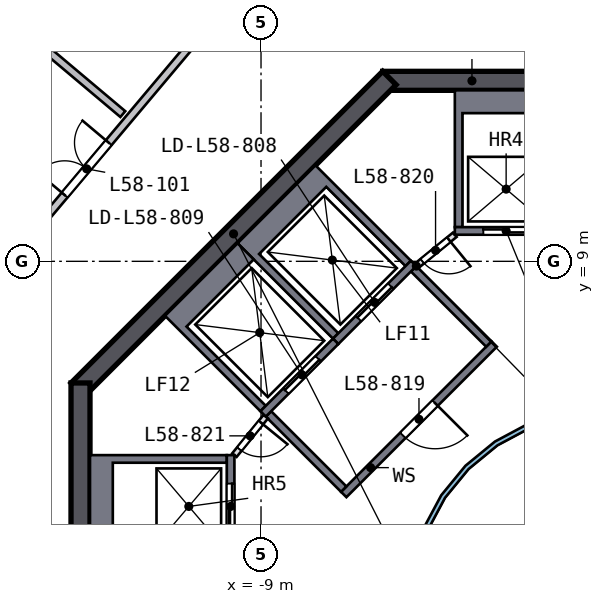
"""IFC4 building model, lengths in metres.
Left out: names, types, materials, properties, quantities, classifications, styles, units other than length and angle.
Written with IfcOpenShell. Run it as: python <this file> out.ifc"""

import sys

from ifc_helpers import new_model, si_unit, direction, frame, frame_2d, origin, place, context, subcontext, project, spatial, polyline, rectangle, outline, extrude, element, fill, save


model = new_model("IFC4")
c1 = context("Model", 3, precision=1e-05, world=origin(), true_north=direction((0.0, 1.0)))
c2 = subcontext(c1, "Body", "Model", "MODEL_VIEW")
j1 = project(units=[si_unit("LENGTHUNIT", "METRE"), si_unit("PLANEANGLEUNIT", "RADIAN")], contexts=[c1])
p1 = place(None, origin())
s1 = spatial("IfcSite", under=j1, at=p1, CompositionType="ELEMENT")
p2 = place(p1, origin())
s2 = spatial("IfcBuilding", under=s1, at=p2, CompositionType="ELEMENT")
p3 = place(p2, frame((0.0, 0.0, 237.5)))
s3 = spatial("IfcBuildingStorey", under=s2, at=p3, CompositionType="ELEMENT", Elevation=237.5)
p4 = place(p3, frame((5.799, 13.75, 0.0), z_axis=(0.0, 0.0, 1.0), x_axis=(-1.0, 0.0, 0.0)))
e1 = element("IfcWall", 1, at=p4, inside=s3, PredefinedType="SHEAR", context=c2, shape_type="SweptSolid", body=[
    extrude(rectangle(XDim=11.598, YDim=0.5, at=frame_2d((5.799, 0.0))), origin(), (0.0, 0.0, 1.0), 3.5),
])
p5 = place(p4, frame((4.899, 0.0, 0.0)))
e2 = element("IfcOpeningElement", 2, at=p5, cuts=e1, PredefinedType="OPENING", context=c2, shape_type="SweptSolid", body=[
    extrude(rectangle(XDim=1.8, YDim=2.1, at=frame_2d((0.9, 1.05))), frame((0.0, 0.26, 0.0), z_axis=(0.0, -1.0, 0.0), x_axis=(1.0, 0.0, 0.0)), (0.0, 0.0, 1.0), 0.52),
])
p6 = place(p3, frame((-5.622, 13.823, 0.0), z_axis=(0.0, 0.0, 1.0), x_axis=(-0.707106781, -0.707106781, 0.0)))
e3 = element("IfcWall", 3, at=p6, inside=s3, PredefinedType="SHEAR", context=c2, shape_type="SweptSolid", body=[
    extrude(rectangle(XDim=11.598, YDim=0.5, at=frame_2d((5.799, 0.0))), origin(), (0.0, 0.0, 1.0), 3.5),
])
p7 = place(p3, frame((-13.75, 5.799, 0.0), z_axis=(0.0, 0.0, 1.0), x_axis=(0.0, -1.0, 0.0)))
e4 = element("IfcWall", 4, at=p7, inside=s3, PredefinedType="SHEAR", context=c2, shape_type="SweptSolid", body=[
    extrude(rectangle(XDim=11.598, YDim=0.5, at=frame_2d((5.799, 0.0))), origin(), (0.0, 0.0, 1.0), 3.5),
])
p8 = place(p7, frame((4.899, 0.0, 0.0)))
e5 = element("IfcOpeningElement", 5, at=p8, cuts=e4, PredefinedType="OPENING", context=c2, shape_type="SweptSolid", body=[
    extrude(rectangle(XDim=1.8, YDim=2.1, at=frame_2d((0.9, 1.05))), frame((0.0, 0.26, 0.0), z_axis=(0.0, -1.0, 0.0), x_axis=(1.0, 0.0, 0.0)), (0.0, 0.0, 1.0), 0.52),
])
p9 = place(p3, origin())
e6 = element("IfcWall", 6, at=p9, inside=s3, PredefinedType="SOLIDWALL", context=c2, shape_type="SweptSolid", body=[
    extrude(outline(polyline([(-3.9, 13.5), (-1.2, 13.5), (-1.2, 9.9), (-1.4, 9.9), (-1.4, 12.9), (-3.7, 12.9), (-3.7, 9.9), (-3.9, 9.9), (-3.9, 13.5)])), origin(), (0.0, 0.0, 1.0), 3.19),
])
p10 = place(p3, frame((-1.2, 9.8, 0.0), z_axis=(0.0, 0.0, 1.0), x_axis=(-1.0, 0.0, 0.0)))
e7 = element("IfcWall", 7, at=p10, inside=s3, PredefinedType="SOLIDWALL", context=c2, shape_type="SweptSolid", body=[
    extrude(rectangle(XDim=2.7, YDim=0.2, at=frame_2d((1.35, 0.0))), origin(), (0.0, 0.0, 1.0), 3.19),
])
p11 = place(p10, frame((0.75, 0.0, 0.0)))
e8 = element("IfcOpeningElement", 8, at=p11, cuts=e7, PredefinedType="OPENING", context=c2, shape_type="SweptSolid", body=[
    extrude(rectangle(XDim=1.2, YDim=2.1, at=frame_2d((0.6, 1.05))), frame((0.0, 0.11, 0.0), z_axis=(0.0, -1.0, 0.0), x_axis=(1.0, 0.0, 0.0)), (0.0, 0.0, 1.0), 0.22),
])
p12 = place(p3, origin())
e9 = element("IfcWall", 9, at=p12, inside=s3, PredefinedType="SOLIDWALL", context=c2, shape_type="SweptSolid", body=[
    extrude(outline(polyline([(-13.5, 3.9), (-9.9, 3.9), (-9.9, 3.7), (-12.9, 3.7), (-12.9, 1.4), (-9.9, 1.4), (-9.9, 1.2), (-13.5, 1.2), (-13.5, 3.9)])), origin(), (0.0, 0.0, 1.0), 3.19),
])
p13 = place(p3, frame((-9.8, 1.2, 0.0), z_axis=(0.0, 0.0, 1.0), x_axis=(0.0, 1.0, 0.0)))
e10 = element("IfcWall", 10, at=p13, inside=s3, PredefinedType="SOLIDWALL", context=c2, shape_type="SweptSolid", body=[
    extrude(rectangle(XDim=2.7, YDim=0.2, at=frame_2d((1.35, 0.0))), origin(), (0.0, 0.0, 1.0), 3.19),
])
p14 = place(p13, frame((0.75, 0.0, 0.0)))
e11 = element("IfcOpeningElement", 11, at=p14, cuts=e10, PredefinedType="OPENING", context=c2, shape_type="SweptSolid", body=[
    extrude(rectangle(XDim=1.2, YDim=2.1, at=frame_2d((0.6, 1.05))), frame((0.0, 0.11, 0.0), z_axis=(0.0, -1.0, 0.0), x_axis=(1.0, 0.0, 0.0)), (0.0, 0.0, 1.0), 0.22),
])
p15 = place(p3, origin())
e12 = element("IfcWall", 12, at=p15, inside=s3, PredefinedType="SOLIDWALL", context=c2, shape_type="SweptSolid", body=[
    extrude(outline(polyline([(-9.617, 9.475), (-7.566, 11.526), (-5.056, 9.016), (-5.197, 8.874), (-7.283, 10.96), (-9.051, 9.192), (-6.965, 7.106), (-7.106, 6.965), (-9.617, 9.475)])), origin(), (0.0, 0.0, 1.0), 3.19),
])
p16 = place(p3, frame((-4.985, 8.945, 0.0), z_axis=(0.0, 0.0, 1.0), x_axis=(-0.707106781, -0.707106781, 0.0)))
e13 = element("IfcWall", 13, at=p16, inside=s3, PredefinedType="SOLIDWALL", context=c2, shape_type="SweptSolid", body=[
    extrude(rectangle(XDim=2.9, YDim=0.2, at=frame_2d((1.45, 0.0))), origin(), (0.0, 0.0, 1.0), 3.19),
])
p17 = place(p16, frame((0.85, 0.0, 0.0)))
e14 = element("IfcOpeningElement", 14, at=p17, cuts=e13, PredefinedType="OPENING", context=c2, shape_type="SweptSolid", body=[
    extrude(rectangle(XDim=1.2, YDim=2.1, at=frame_2d((0.6, 1.05))), frame((0.0, 0.11, 0.0), z_axis=(0.0, -1.0, 0.0), x_axis=(1.0, 0.0, 0.0)), (0.0, 0.0, 1.0), 0.22),
])
p18 = place(p3, origin())
e15 = element("IfcWall", 15, at=p18, inside=s3, PredefinedType="SOLIDWALL", context=c2, shape_type="SweptSolid", body=[
    extrude(outline(polyline([(-11.526, 7.566), (-9.617, 9.475), (-9.192, 9.051), (-10.96, 7.283), (-8.874, 5.197), (-9.016, 5.056), (-11.526, 7.566)])), origin(), (0.0, 0.0, 1.0), 3.19),
])
p19 = place(p3, frame((-7.036, 6.894, 0.0), z_axis=(0.0, 0.0, 1.0), x_axis=(-0.707106781, -0.707106781, 0.0)))
e16 = element("IfcWall", 16, at=p19, inside=s3, PredefinedType="SOLIDWALL", context=c2, shape_type="SweptSolid", body=[
    extrude(rectangle(XDim=2.7, YDim=0.2, at=frame_2d((1.35, 0.0))), origin(), (0.0, 0.0, 1.0), 3.19),
])
p20 = place(p19, frame((0.65, 0.0, 0.0)))
e17 = element("IfcOpeningElement", 17, at=p20, cuts=e16, PredefinedType="OPENING", context=c2, shape_type="SweptSolid", body=[
    extrude(rectangle(XDim=1.2, YDim=2.1, at=frame_2d((0.6, 1.05))), frame((0.0, 0.11, 0.0), z_axis=(0.0, -1.0, 0.0), x_axis=(1.0, 0.0, 0.0)), (0.0, 0.0, 1.0), 0.22),
])
p21 = place(p3, frame((-2.864, 6.823, 0.0), z_axis=(0.0, 0.0, 1.0), x_axis=(-0.707106781, -0.707106781, 0.0)))
e18 = element("IfcWall", 18, at=p21, inside=s3, PredefinedType="SOLIDWALL", context=c2, shape_type="SweptSolid", body=[
    extrude(rectangle(XDim=5.6, YDim=0.2, at=frame_2d((2.8, 0.0))), origin(), (0.0, 0.0, 1.0), 3.19),
])
p22 = place(p21, frame((2.2, 0.0, 0.0)))
e19 = element("IfcOpeningElement", 19, at=p22, cuts=e18, PredefinedType="OPENING", context=c2, shape_type="SweptSolid", body=[
    extrude(rectangle(XDim=1.2, YDim=2.1, at=frame_2d((0.6, 1.05))), frame((0.0, 0.11, 0.0), z_axis=(0.0, -1.0, 0.0), x_axis=(1.0, 0.0, 0.0)), (0.0, 0.0, 1.0), 0.22),
])
for number, where, z_axis, x_axis in (
    (20, (-3.005, 6.823, 0.0), (0.0, 0.0, 1.0), (-0.707, 0.707, 0.0)),
    (21, (-6.823, 3.005, 0.0), (0.0, 0.0, 1.0), (-0.707, 0.707, 0.0)),
):
    element("IfcWall", number, at=place(p3, frame(where, z_axis=z_axis, x_axis=x_axis)), inside=s3, PredefinedType="SOLIDWALL", context=c2, shape_type="SweptSolid", body=[
        extrude(rectangle(XDim=2.8, YDim=0.2, at=frame_2d((1.4, 0.0))), origin(), (0.0, 0.0, 1.0), 3.19),
    ])
p23 = place(p3, frame((-3.9, 9.7, 0.0), z_axis=(0.0, 0.0, 1.0), x_axis=(-0.775559878, -0.631274009, 0.0)))
e22 = element("IfcWall", 22, at=p23, inside=s3, PredefinedType="PARTITIONING", context=c2, shape_type="SweptSolid", body=[
    extrude(rectangle(XDim=1.308, YDim=0.15, at=frame_2d((0.654, 0.0))), origin(), (0.0, 0.0, 1.0), 3.19),
])
p24 = place(p23, frame((0.204, 0.0, 0.0)))
e23 = element("IfcOpeningElement", 23, at=p24, cuts=e22, PredefinedType="OPENING", context=c2, shape_type="SweptSolid", body=[
    extrude(rectangle(XDim=0.9, YDim=2.1, at=frame_2d((0.45, 1.05))), frame((0.0, 0.085, 0.0), z_axis=(0.0, -1.0, 0.0), x_axis=(1.0, 0.0, 0.0)), (0.0, 0.0, 1.0), 0.17),
])
p25 = place(p3, frame((-8.874, 4.914, 0.0), z_axis=(0.0, 0.0, 1.0), x_axis=(-0.631274009, -0.775559878, 0.0)))
e24 = element("IfcWall", 24, at=p25, inside=s3, PredefinedType="PARTITIONING", context=c2, shape_type="SweptSolid", body=[
    extrude(rectangle(XDim=1.308, YDim=0.15, at=frame_2d((0.654, 0.0))), origin(), (0.0, 0.0, 1.0), 3.19),
])
p26 = place(p25, frame((0.204, 0.0, 0.0)))
e25 = element("IfcOpeningElement", 25, at=p26, cuts=e24, PredefinedType="OPENING", context=c2, shape_type="SweptSolid", body=[
    extrude(rectangle(XDim=0.9, YDim=2.1, at=frame_2d((0.45, 1.05))), frame((0.0, 0.085, 0.0), z_axis=(0.0, -1.0, 0.0), x_axis=(1.0, 0.0, 0.0)), (0.0, 0.0, 1.0), 0.17),
])
p27 = place(p3, origin())
e26 = element("IfcWall", 26, at=p27, inside=s3, PredefinedType="SOLIDWALL", context=c2, shape_type="SweptSolid", body=[
    extrude(outline(polyline([(5.021, -0.999), (4.73, -1.959), (4.257, -2.844), (3.62, -3.62), (2.844, -4.257), (1.959, -4.73), (0.999, -5.021), (0.0, -5.12), (-0.999, -5.021), (-1.959, -4.73), (-2.844, -4.257), (-3.62, -3.62), (-4.257, -2.844), (-4.73, -1.959), (-5.021, -0.999), (-5.12, 0.0), (-5.021, 0.999), (-4.73, 1.959), (-4.257, 2.844), (-3.62, 3.62), (-2.844, 4.257), (-1.959, 4.73), (-0.999, 5.021), (0.0, 5.12), (0.999, 5.021), (1.959, 4.73), (2.844, 4.257), (3.62, 3.62), (4.257, 2.844), (4.73, 1.959), (5.021, 0.999), (5.12, 0.0), (5.021, -0.999)]), holes=[polyline([(4.904, 0.976), (4.619, 1.913), (4.157, 2.778), (3.535, 3.535), (2.778, 4.157), (1.913, 4.619), (0.976, 4.904), (0.0, 5.0), (-0.976, 4.904), (-1.913, 4.619), (-2.778, 4.157), (-3.535, 3.535), (-4.157, 2.778), (-4.619, 1.913), (-4.904, 0.976), (-5.0, 0.0), (-4.904, -0.976), (-4.619, -1.913), (-4.157, -2.778), (-3.535, -3.535), (-2.778, -4.157), (-1.913, -4.619), (-0.976, -4.904), (0.0, -5.0), (0.976, -4.904), (1.913, -4.619), (2.778, -4.157), (3.535, -3.535), (4.157, -2.778), (4.619, -1.913), (4.904, -0.976), (5.0, 0.0), (4.904, 0.976)])]), origin(), (0.0, 0.0, 1.0), 3.19),
])
p28 = place(p3, frame((-16.651, 7.793, 0.0), z_axis=(0.0, 0.0, 1.0), x_axis=(0.64385004, 0.765151702, 0.0)))
e27 = element("IfcWall", 27, at=p28, inside=s3, PredefinedType="SOLIDWALL", context=c2, shape_type="SweptSolid", body=[
    extrude(rectangle(XDim=9.317, YDim=0.2, at=frame_2d((4.658, 0.0))), origin(), (0.0, 0.0, 1.0), 3.19),
])
p29 = place(p28, frame((3.858, 0.0, 0.0)))
e28 = element("IfcOpeningElement", 28, at=p29, cuts=e27, PredefinedType="OPENING", context=c2, shape_type="SweptSolid", body=[
    extrude(rectangle(XDim=1.8, YDim=2.1, at=frame_2d((0.9, 1.05))), frame((0.0, 0.11, 0.0), z_axis=(0.0, -1.0, 0.0), x_axis=(1.0, 0.0, 0.0)), (0.0, 0.0, 1.0), 0.22),
])
p30 = place(p3, frame((-22.65, 21.3, 0.0), z_axis=(0.0, 0.0, 1.0), x_axis=(0.765152558, -0.643849022, 0.0)))
e29 = element("IfcWall", 29, at=p30, inside=s3, PredefinedType="SOLIDWALL", context=c2, shape_type="SweptSolid", body=[
    extrude(rectangle(XDim=13.086, YDim=0.2, at=frame_2d((6.543, 0.0))), origin(), (0.0, 0.0, 1.0), 3.19),
])
p31 = place(p30, frame((4.05, 0.0, 0.0)))
e30 = element("IfcOpeningElement", 30, at=p31, cuts=e29, PredefinedType="OPENING", context=c2, shape_type="SweptSolid", body=[
    extrude(rectangle(XDim=1.0, YDim=2.1, at=frame_2d((0.5, 1.05))), frame((0.0, 0.11, 0.0), z_axis=(0.0, -1.0, 0.0), x_axis=(1.0, 0.0, 0.0)), (0.0, 0.0, 1.0), 0.22),
])
p32 = place(p11, origin())
e31 = element("IfcDoor", 31, at=p32, inside=s3, OperationType="DOUBLE_DOOR_SLIDING", PredefinedType="DOOR", context=c2, shape_type="SweptSolid", body=[
    extrude(rectangle(XDim=1.2, YDim=2.1, at=frame_2d((0.6, 1.05))), frame((0.0, 0.025, 0.0), z_axis=(0.0, -1.0, 0.0), x_axis=(1.0, 0.0, 0.0)), (0.0, 0.0, 1.0), 0.05),
])
fill(e8, e31)
p33 = place(p14, origin())
e32 = element("IfcDoor", 32, at=p33, inside=s3, OperationType="DOUBLE_DOOR_SLIDING", PredefinedType="DOOR", context=c2, shape_type="SweptSolid", body=[
    extrude(rectangle(XDim=1.2, YDim=2.1, at=frame_2d((0.6, 1.05))), frame((0.0, 0.025, 0.0), z_axis=(0.0, -1.0, 0.0), x_axis=(1.0, 0.0, 0.0)), (0.0, 0.0, 1.0), 0.05),
])
fill(e11, e32)
p34 = place(p17, origin())
e33 = element("IfcDoor", 33, at=p34, inside=s3, OperationType="DOUBLE_DOOR_SLIDING", PredefinedType="DOOR", context=c2, shape_type="SweptSolid", body=[
    extrude(rectangle(XDim=1.2, YDim=2.1, at=frame_2d((0.6, 1.05))), frame((0.0, 0.025, 0.0), z_axis=(0.0, -1.0, 0.0), x_axis=(1.0, 0.0, 0.0)), (0.0, 0.0, 1.0), 0.05),
])
fill(e14, e33)
p35 = place(p20, origin())
e34 = element("IfcDoor", 34, at=p35, inside=s3, OperationType="DOUBLE_DOOR_SLIDING", PredefinedType="DOOR", context=c2, shape_type="SweptSolid", body=[
    extrude(rectangle(XDim=1.2, YDim=2.1, at=frame_2d((0.6, 1.05))), frame((0.0, 0.025, 0.0), z_axis=(0.0, -1.0, 0.0), x_axis=(1.0, 0.0, 0.0)), (0.0, 0.0, 1.0), 0.05),
])
fill(e17, e34)
p36 = place(p22, origin())
e35 = element("IfcDoor", 35, at=p36, inside=s3, OperationType="SINGLE_SWING_LEFT", PredefinedType="DOOR", context=c2, shape_type="SweptSolid", body=[
    extrude(rectangle(XDim=1.2, YDim=2.1, at=frame_2d((0.6, 1.05))), frame((0.0, 0.025, 0.0), z_axis=(0.0, -1.0, 0.0), x_axis=(1.0, 0.0, 0.0)), (0.0, 0.0, 1.0), 0.05),
])
fill(e19, e35)
p37 = place(p24, origin())
e36 = element("IfcDoor", 36, at=p37, inside=s3, OperationType="SINGLE_SWING_LEFT", PredefinedType="DOOR", context=c2, shape_type="SweptSolid", body=[
    extrude(rectangle(XDim=0.9, YDim=2.1, at=frame_2d((0.45, 1.05))), frame((0.0, 0.025, 0.0), z_axis=(0.0, -1.0, 0.0), x_axis=(1.0, 0.0, 0.0)), (0.0, 0.0, 1.0), 0.05),
])
fill(e23, e36)
p38 = place(p26, origin())
e37 = element("IfcDoor", 37, at=p38, inside=s3, OperationType="SINGLE_SWING_LEFT", PredefinedType="DOOR", context=c2, shape_type="SweptSolid", body=[
    extrude(rectangle(XDim=0.9, YDim=2.1, at=frame_2d((0.45, 1.05))), frame((0.0, 0.025, 0.0), z_axis=(0.0, -1.0, 0.0), x_axis=(1.0, 0.0, 0.0)), (0.0, 0.0, 1.0), 0.05),
])
fill(e25, e37)
p39 = place(p29, origin())
e38 = element("IfcDoor", 38, at=p39, inside=s3, OperationType="DOUBLE_DOOR_SINGLE_SWING", PredefinedType="DOOR", context=c2, shape_type="SweptSolid", body=[
    extrude(rectangle(XDim=1.8, YDim=2.1, at=frame_2d((0.9, 1.05))), frame((0.0, 0.025, 0.0), z_axis=(0.0, -1.0, 0.0), x_axis=(1.0, 0.0, 0.0)), (0.0, 0.0, 1.0), 0.05),
])
fill(e28, e38)
save(model, sys.argv[1])
